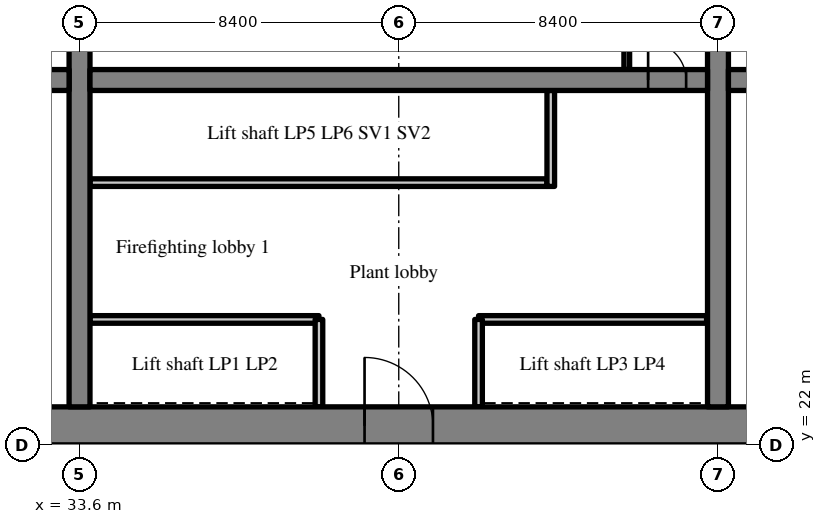
"""IFC4 building model, lengths in metres.
Left out: names, types, materials, properties, quantities, classifications, styles, units other than length and angle.
Written with IfcOpenShell. Run it as: python <this file> out.ifc"""

import sys

from ifc_helpers import new_model, si_unit, direction, frame, frame_2d, origin, place, context, subcontext, project, spatial, rectangle, extrude, source, transform, mapped, element, fill, save


model = new_model("IFC4")
c1 = context("Model", 3, precision=1e-05, world=origin(), true_north=direction((0.0, 1.0)))
c2 = subcontext(c1, "Body", "Model", "MODEL_VIEW")
j1 = project(units=[si_unit("LENGTHUNIT", "METRE"), si_unit("PLANEANGLEUNIT", "RADIAN")], contexts=[c1])
p1 = place(None, origin())
s1 = spatial("IfcSite", under=j1, at=p1, CompositionType="ELEMENT")
p2 = place(p1, origin())
s2 = spatial("IfcBuilding", under=s1, at=p2, CompositionType="ELEMENT")
p3 = place(p2, frame((0.0, 0.0, 81.0)))
s3 = spatial("IfcBuildingStorey", under=s2, at=p3, CompositionType="ELEMENT", Elevation=81.0)
m1 = source(origin(), c2, "Body", "SweptSolid", [
    extrude(rectangle(XDim=50.4, YDim=1.0, at=frame_2d((25.2, 0.0))), origin(), (0.0, 0.0, 1.0), 5.12),
])
p4 = place(p3, frame((25.2, 22.5, 0.0), z_axis=(0.0, 0.0, 1.0), x_axis=(1.0, 0.0, 0.0)))
e1 = element("IfcWall", 1, at=p4, inside=s3, PredefinedType="SHEAR", context=c2, shape_type="MappedRepresentation", body=[
    mapped(m1, transform((0.0, 0.0, 0.0), scale=1.0)),
])
m2 = source(origin(), c2, "Body", "SweptSolid", [
    extrude(rectangle(XDim=1.8, YDim=2.1, at=frame_2d((0.9, 1.05))), frame((0.0, 0.51, 0.0), z_axis=(0.0, -1.0, 0.0), x_axis=(1.0, 0.0, 0.0)), (0.0, 0.0, 1.0), 1.02),
])
p5 = place(p4, frame((15.9, 0.0, 0.0)))
e2 = element("IfcOpeningElement", 2, at=p5, cuts=e1, PredefinedType="OPENING", context=c2, shape_type="MappedRepresentation", body=[
    mapped(m2, transform((0.0, 0.0, 0.0), scale=1.0)),
])
m3 = source(origin(), c2, "Body", "SweptSolid", [
    extrude(rectangle(XDim=1.2, YDim=2.1, at=frame_2d((0.6, 1.05))), frame((0.0, 0.51, 0.0), z_axis=(0.0, -1.0, 0.0), x_axis=(1.0, 0.0, 0.0)), (0.0, 0.0, 1.0), 1.02),
])
p6 = place(p4, frame((26.987, 0.0, 0.0)))
e3 = element("IfcOpeningElement", 3, at=p6, cuts=e1, PredefinedType="OPENING", context=c2, shape_type="MappedRepresentation", body=[
    mapped(m3, transform((0.0, 0.0, 0.0), scale=1.0)),
])
m4 = source(origin(), c2, "Body", "SweptSolid", [
    extrude(rectangle(XDim=0.9, YDim=2.1, at=frame_2d((0.45, 1.05))), frame((0.0, 0.51, 0.0), z_axis=(0.0, -1.0, 0.0), x_axis=(1.0, 0.0, 0.0)), (0.0, 0.0, 1.0), 1.02),
])
p7 = place(p4, frame((33.75, 0.0, 0.0)))
e4 = element("IfcOpeningElement", 4, at=p7, cuts=e1, PredefinedType="OPENING", context=c2, shape_type="MappedRepresentation", body=[
    mapped(m4, transform((0.0, 0.0, 0.0), scale=1.0)),
])
p8 = place(p4, frame((30.75, 0.0, 0.0)))
e5 = element("IfcOpeningElement", 5, at=p8, cuts=e1, PredefinedType="OPENING", context=c2, shape_type="MappedRepresentation", body=[
    mapped(m4, transform((0.0, 0.0, 0.0), scale=1.0)),
])
p9 = place(p4, frame((38.262, 0.0, 0.0)))
e6 = element("IfcOpeningElement", 6, at=p9, cuts=e1, PredefinedType="OPENING", context=c2, shape_type="MappedRepresentation", body=[
    mapped(m4, transform((0.0, 0.0, 0.0), scale=1.0)),
])
p10 = place(p4, frame((6.438, 0.0, 0.0)))
e7 = element("IfcOpeningElement", 7, at=p10, cuts=e1, PredefinedType="OPENING", context=c2, shape_type="MappedRepresentation", body=[
    mapped(m3, transform((0.0, 0.0, 0.0), scale=1.0)),
])
p11 = place(p4, frame((47.725, 0.0, 0.0)))
e8 = element("IfcOpeningElement", 8, at=p11, cuts=e1, PredefinedType="OPENING", context=c2, shape_type="MappedRepresentation", body=[
    mapped(m3, transform((0.0, 0.0, 0.0), scale=1.0)),
])
m5 = source(origin(), c2, "Body", "SweptSolid", [
    extrude(rectangle(XDim=18.0, YDim=0.55, at=frame_2d((9.0, 0.0))), origin(), (0.0, 0.0, 1.0), 5.12),
])
p12 = place(p3, frame((33.6, 23.0, 0.0), z_axis=(0.0, 0.0, 1.0), x_axis=(0.0, 1.0, 0.0)))
e9 = element("IfcWall", 9, at=p12, inside=s3, PredefinedType="SHEAR", context=c2, shape_type="MappedRepresentation", body=[
    mapped(m5, transform((0.0, 0.0, 0.0), scale=1.0)),
])
m6 = source(origin(), c2, "Body", "SweptSolid", [
    extrude(rectangle(XDim=1.1, YDim=2.1, at=frame_2d((0.55, 1.05))), frame((0.0, 0.285, 0.0), z_axis=(0.0, -1.0, 0.0), x_axis=(1.0, 0.0, 0.0)), (0.0, 0.0, 1.0), 0.57),
])
p13 = place(p12, frame((12.45, 0.0, 0.0)))
e10 = element("IfcOpeningElement", 10, at=p13, cuts=e9, PredefinedType="OPENING", context=c2, shape_type="MappedRepresentation", body=[
    mapped(m6, transform((0.0, 0.0, 0.0), scale=1.0)),
])
p14 = place(p3, frame((50.4, 23.0, 0.0), z_axis=(0.0, 0.0, 1.0), x_axis=(0.0, 1.0, 0.0)))
e11 = element("IfcWall", 11, at=p14, inside=s3, PredefinedType="SHEAR", context=c2, shape_type="MappedRepresentation", body=[
    mapped(m5, transform((0.0, 0.0, 0.0), scale=1.0)),
])
p15 = place(p14, frame((12.45, 0.0, 0.0)))
e12 = element("IfcOpeningElement", 12, at=p15, cuts=e11, PredefinedType="OPENING", context=c2, shape_type="MappedRepresentation", body=[
    mapped(m6, transform((0.0, 0.0, 0.0), scale=1.0)),
])
m7 = source(origin(), c2, "Body", "SweptSolid", [
    extrude(rectangle(XDim=7.125, YDim=0.55, at=frame_2d((3.562, 0.0))), origin(), (0.0, 0.0, 1.0), 5.12),
])
p16 = place(p3, frame((26.2, 31.6, 0.0), z_axis=(0.0, 0.0, 1.0), x_axis=(1.0, 0.0, 0.0)))
e13 = element("IfcWall", 13, at=p16, inside=s3, PredefinedType="SHEAR", context=c2, shape_type="MappedRepresentation", body=[
    mapped(m7, transform((0.0, 0.0, 0.0), scale=1.0)),
])
p17 = place(p16, frame((5.488, 0.0, 0.0)))
e14 = element("IfcOpeningElement", 14, at=p17, cuts=e13, PredefinedType="OPENING", context=c2, shape_type="MappedRepresentation", body=[
    mapped(m6, transform((0.0, 0.0, 0.0), scale=1.0)),
])
m8 = source(origin(), c2, "Body", "SweptSolid", [
    extrude(rectangle(XDim=16.25, YDim=0.55, at=frame_2d((8.125, 0.0))), origin(), (0.0, 0.0, 1.0), 5.12),
])
p18 = place(p3, frame((33.875, 31.6, 0.0), z_axis=(0.0, 0.0, 1.0), x_axis=(1.0, 0.0, 0.0)))
e15 = element("IfcWall", 15, at=p18, inside=s3, PredefinedType="SHEAR", context=c2, shape_type="MappedRepresentation", body=[
    mapped(m8, transform((0.0, 0.0, 0.0), scale=1.0)),
])
m9 = source(origin(), c2, "Body", "SweptSolid", [
    extrude(rectangle(XDim=1.0, YDim=2.1, at=frame_2d((0.5, 1.05))), frame((0.0, 0.285, 0.0), z_axis=(0.0, -1.0, 0.0), x_axis=(1.0, 0.0, 0.0)), (0.0, 0.0, 1.0), 0.57),
])
p19 = place(p18, frame((14.687, 0.0, 0.0)))
e16 = element("IfcOpeningElement", 16, at=p19, cuts=e15, PredefinedType="OPENING", context=c2, shape_type="MappedRepresentation", body=[
    mapped(m9, transform((0.0, 0.0, 0.0), scale=1.0)),
])
p20 = place(p3, frame((50.675, 31.6, 0.0), z_axis=(0.0, 0.0, 1.0), x_axis=(1.0, 0.0, 0.0)))
e17 = element("IfcWall", 17, at=p20, inside=s3, PredefinedType="SHEAR", context=c2, shape_type="MappedRepresentation", body=[
    mapped(m8, transform((0.0, 0.0, 0.0), scale=1.0)),
])
p21 = place(p20, frame((0.562, 0.0, 0.0)))
e18 = element("IfcOpeningElement", 18, at=p21, cuts=e17, PredefinedType="OPENING", context=c2, shape_type="MappedRepresentation", body=[
    mapped(m9, transform((0.0, 0.0, 0.0), scale=1.0)),
])
m10 = source(origin(), c2, "Body", "SweptSolid", [
    extrude(rectangle(XDim=6.025, YDim=0.2, at=frame_2d((3.012, 0.0))), origin(), (0.0, 0.0, 1.0), 5.12),
])
p22 = place(p3, frame((33.875, 25.3, 0.0), z_axis=(0.0, 0.0, 1.0), x_axis=(1.0, 0.0, 0.0)))
e19 = element("IfcWall", 19, at=p22, inside=s3, PredefinedType="SOLIDWALL", context=c2, shape_type="MappedRepresentation", body=[
    mapped(m10, transform((0.0, 0.0, 0.0), scale=1.0)),
])
m11 = source(origin(), c2, "Body", "SweptSolid", [
    extrude(rectangle(XDim=6.0, YDim=0.2, at=frame_2d((3.0, 0.0))), origin(), (0.0, 0.0, 1.0), 5.12),
])
p23 = place(p3, frame((44.1, 25.3, 0.0), z_axis=(0.0, 0.0, 1.0), x_axis=(1.0, 0.0, 0.0)))
e20 = element("IfcWall", 20, at=p23, inside=s3, PredefinedType="SOLIDWALL", context=c2, shape_type="MappedRepresentation", body=[
    mapped(m11, transform((0.0, 0.0, 0.0), scale=1.0)),
])
m12 = source(origin(), c2, "Body", "SweptSolid", [
    extrude(rectangle(XDim=12.025, YDim=0.2, at=frame_2d((6.012, 0.0))), origin(), (0.0, 0.0, 1.0), 5.12),
])
p24 = place(p3, frame((33.875, 28.9, 0.0), z_axis=(0.0, 0.0, 1.0), x_axis=(1.0, 0.0, 0.0)))
e21 = element("IfcWall", 21, at=p24, inside=s3, PredefinedType="SOLIDWALL", context=c2, shape_type="MappedRepresentation", body=[
    mapped(m12, transform((0.0, 0.0, 0.0), scale=1.0)),
])
m13 = source(origin(), c2, "Body", "SweptSolid", [
    extrude(rectangle(XDim=2.3, YDim=0.2, at=frame_2d((1.15, 0.0))), origin(), (0.0, 0.0, 1.0), 5.12),
])
for number, where, z_axis, x_axis in (
    (22, (39.9, 23.0, 0.0), (0.0, 0.0, 1.0), (0.0, 1.0, 0.0)),
    (23, (44.1, 23.0, 0.0), (0.0, 0.0, 1.0), (0.0, 1.0, 0.0)),
):
    element("IfcWall", number, at=place(p3, frame(where, z_axis=z_axis, x_axis=x_axis)), inside=s3, PredefinedType="SOLIDWALL", context=c2, shape_type="MappedRepresentation", body=[
        mapped(m13, transform((0.0, 0.0, 0.0), scale=1.0)),
    ])
m14 = source(origin(), c2, "Body", "SweptSolid", [
    extrude(rectangle(XDim=2.525, YDim=0.2, at=frame_2d((1.262, 0.0))), origin(), (0.0, 0.0, 1.0), 5.12),
])
p25 = place(p3, frame((46.0, 28.8, 0.0), z_axis=(0.0, 0.0, 1.0), x_axis=(0.0, 1.0, 0.0)))
e24 = element("IfcWall", 24, at=p25, inside=s3, PredefinedType="SOLIDWALL", context=c2, shape_type="MappedRepresentation", body=[
    mapped(m14, transform((0.0, 0.0, 0.0), scale=1.0)),
])
m15 = source(origin(), c2, "Body", "SweptSolid", [
    extrude(rectangle(XDim=3.125, YDim=0.15, at=frame_2d((1.562, 0.0))), origin(), (0.0, 0.0, 1.0), 5.12),
])
p26 = place(p3, frame((48.0, 31.875, 0.0), z_axis=(0.0, 0.0, 1.0), x_axis=(0.0, 1.0, 0.0)))
e25 = element("IfcWall", 25, at=p26, inside=s3, PredefinedType="PARTITIONING", context=c2, shape_type="MappedRepresentation", body=[
    mapped(m15, transform((0.0, 0.0, 0.0), scale=1.0)),
])
m16 = source(origin(), c2, "Body", "SweptSolid", [
    extrude(rectangle(XDim=1.8, YDim=2.1, at=frame_2d((0.9, 1.05))), frame((0.0, 0.375, 0.0), z_axis=(0.0, -1.0, 0.0), x_axis=(1.0, 0.0, 0.0)), (0.0, 0.0, 1.0), 0.05),
])
p27 = place(p5, origin())
e26 = element("IfcDoor", 26, at=p27, inside=s3, OperationType="DOUBLE_DOOR_SINGLE_SWING", PredefinedType="DOOR", context=c2, shape_type="MappedRepresentation", body=[
    mapped(m16, transform((0.0, 0.0, 0.0), scale=1.0)),
])
fill(e2, e26)
m17 = source(origin(), c2, "Body", "SweptSolid", [
    extrude(rectangle(XDim=1.0, YDim=2.1, at=frame_2d((0.5, 1.05))), frame((0.0, 0.025, 0.0), z_axis=(0.0, -1.0, 0.0), x_axis=(1.0, 0.0, 0.0)), (0.0, 0.0, 1.0), 0.05),
])
p28 = place(p19, origin())
e27 = element("IfcDoor", 27, at=p28, inside=s3, OperationType="SINGLE_SWING_LEFT", PredefinedType="DOOR", context=c2, shape_type="MappedRepresentation", body=[
    mapped(m17, transform((0.0, 0.0, 0.0), scale=1.0)),
])
fill(e16, e27)
save(model, sys.argv[1])
